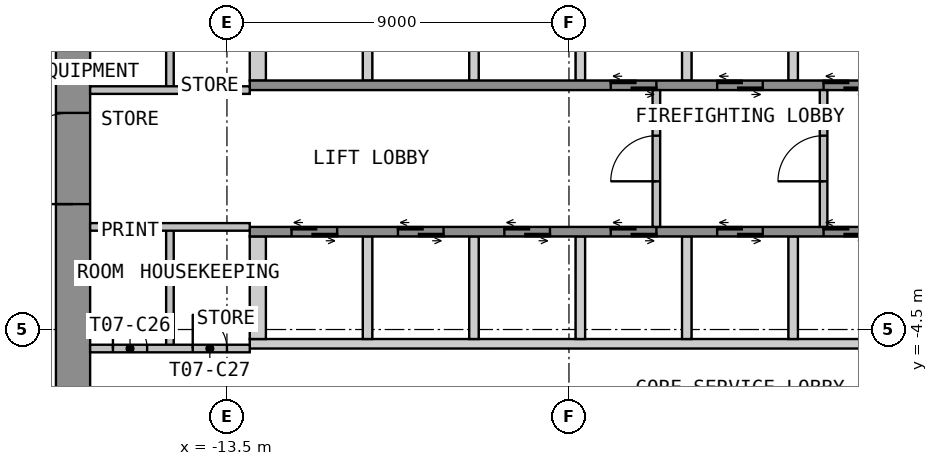
"""IFC4 building model, lengths in metres.
Left out: names, types, materials, properties, quantities, classifications, styles, units other than length and angle.
Written with IfcOpenShell. Run it as: python <this file> out.ifc"""

import sys

from ifc_helpers import new_model, si_unit, direction, frame, frame_2d, origin, place, context, subcontext, project, spatial, polyline, rectangle, outline, extrude, element, fill, save


model = new_model("IFC4")
c1 = context("Model", 3, precision=1e-05, world=origin(), true_north=direction((0.0, 1.0)))
c2 = subcontext(c1, "Body", "Model", "MODEL_VIEW")
j1 = project(units=[si_unit("LENGTHUNIT", "METRE"), si_unit("PLANEANGLEUNIT", "RADIAN")], contexts=[c1])
p1 = place(None, origin())
s1 = spatial("IfcSite", under=j1, at=p1, CompositionType="ELEMENT")
p2 = place(p1, origin())
s2 = spatial("IfcBuilding", under=s1, at=p2, CompositionType="ELEMENT")
p3 = place(p2, frame((0.0, 0.0, 104.7)))
s3 = spatial("IfcBuildingStorey", under=s2, at=p3, CompositionType="ELEMENT", Elevation=104.7)
p4 = place(p3, frame((-17.55, -12.6, 0.0), z_axis=(0.0, 0.0, 1.0), x_axis=(0.0, 1.0, 0.0)))
e1 = element("IfcWall", 1, at=p4, inside=s3, PredefinedType="SHEAR", context=c2, shape_type="SweptSolid", body=[
    extrude(rectangle(XDim=25.2, YDim=0.9, at=frame_2d((12.6, 0.0))), origin(), (0.0, 0.0, 1.0), 3.525),
])
p5 = place(p4, frame((11.4, 0.0, 0.0)))
e2 = element("IfcOpeningElement", 2, at=p5, cuts=e1, PredefinedType="OPENING", context=c2, shape_type="SweptSolid", body=[
    extrude(rectangle(XDim=2.4, YDim=2.1, at=frame_2d((1.2, 1.05))), frame((0.0, 0.46, 0.0), z_axis=(0.0, -1.0, 0.0), x_axis=(1.0, 0.0, 0.0)), (0.0, 0.0, 1.0), 0.92),
])
p6 = place(p3, origin())
e3 = element("IfcWall", 3, at=p6, inside=s3, PredefinedType="SHEAR", context=c2, shape_type="SweptSolid", body=[
    extrude(outline(polyline([(-12.9, 2.05), (-12.475, 2.05), (-12.475, 4.75), (-12.9, 4.75), (-12.9, 2.05)])), origin(), (0.0, 0.0, 1.0), 3.525),
])
p7 = place(p3, origin())
e4 = element("IfcWall", 4, at=p7, inside=s3, PredefinedType="SHEAR", context=c2, shape_type="SweptSolid", body=[
    extrude(outline(polyline([(-9.925, 2.05), (-9.675, 2.05), (-9.675, 4.75), (-9.925, 4.75), (-9.925, 2.05)])), origin(), (0.0, 0.0, 1.0), 3.525),
])
p8 = place(p3, origin())
e5 = element("IfcWall", 5, at=p8, inside=s3, PredefinedType="SHEAR", context=c2, shape_type="SweptSolid", body=[
    extrude(outline(polyline([(-7.125, 2.05), (-6.875, 2.05), (-6.875, 4.75), (-7.125, 4.75), (-7.125, 2.05)])), origin(), (0.0, 0.0, 1.0), 3.525),
])
p9 = place(p3, origin())
e6 = element("IfcWall", 6, at=p9, inside=s3, PredefinedType="SHEAR", context=c2, shape_type="SweptSolid", body=[
    extrude(outline(polyline([(-4.325, 2.05), (-4.075, 2.05), (-4.075, 4.75), (-4.325, 4.75), (-4.325, 2.05)])), origin(), (0.0, 0.0, 1.0), 3.525),
])
p10 = place(p3, origin())
e7 = element("IfcWall", 7, at=p10, inside=s3, PredefinedType="SHEAR", context=c2, shape_type="SweptSolid", body=[
    extrude(outline(polyline([(-1.525, 2.05), (-1.275, 2.05), (-1.275, 4.75), (-1.525, 4.75), (-1.525, 2.05)])), origin(), (0.0, 0.0, 1.0), 3.525),
])
p11 = place(p3, origin())
e8 = element("IfcWall", 8, at=p11, inside=s3, PredefinedType="SHEAR", context=c2, shape_type="SweptSolid", body=[
    extrude(outline(polyline([(1.275, 2.05), (1.525, 2.05), (1.525, 4.75), (1.275, 4.75), (1.275, 2.05)])), origin(), (0.0, 0.0, 1.0), 3.525),
])
p12 = place(p3, frame((-12.9, 1.925, 0.0), z_axis=(0.0, 0.0, 1.0), x_axis=(1.0, 0.0, 0.0)))
e9 = element("IfcWall", 9, at=p12, inside=s3, PredefinedType="SHEAR", context=c2, shape_type="SweptSolid", body=[
    extrude(rectangle(XDim=25.8, YDim=0.25, at=frame_2d((12.9, 0.0))), origin(), (0.0, 0.0, 1.0), 3.525),
])
p13 = place(p12, frame((9.5, 0.0, 0.0)))
e10 = element("IfcOpeningElement", 10, at=p13, cuts=e9, PredefinedType="OPENING", context=c2, shape_type="SweptSolid", body=[
    extrude(rectangle(XDim=1.2, YDim=2.1, at=frame_2d((0.6, 1.05))), frame((0.0, 0.135, 0.0), z_axis=(0.0, -1.0, 0.0), x_axis=(1.0, 0.0, 0.0)), (0.0, 0.0, 1.0), 0.27),
])
p14 = place(p12, frame((12.3, 0.0, 0.0)))
e11 = element("IfcOpeningElement", 11, at=p14, cuts=e9, PredefinedType="OPENING", context=c2, shape_type="SweptSolid", body=[
    extrude(rectangle(XDim=1.2, YDim=2.1, at=frame_2d((0.6, 1.05))), frame((0.0, 0.135, 0.0), z_axis=(0.0, -1.0, 0.0), x_axis=(1.0, 0.0, 0.0)), (0.0, 0.0, 1.0), 0.27),
])
p15 = place(p12, frame((15.1, 0.0, 0.0)))
e12 = element("IfcOpeningElement", 12, at=p15, cuts=e9, PredefinedType="OPENING", context=c2, shape_type="SweptSolid", body=[
    extrude(rectangle(XDim=1.2, YDim=2.1, at=frame_2d((0.6, 1.05))), frame((0.0, 0.135, 0.0), z_axis=(0.0, -1.0, 0.0), x_axis=(1.0, 0.0, 0.0)), (0.0, 0.0, 1.0), 0.27),
])
p16 = place(p12, frame((17.9, 0.0, 0.0)))
e13 = element("IfcOpeningElement", 13, at=p16, cuts=e9, PredefinedType="OPENING", context=c2, shape_type="SweptSolid", body=[
    extrude(rectangle(XDim=1.2, YDim=2.1, at=frame_2d((0.6, 1.05))), frame((0.0, 0.135, 0.0), z_axis=(0.0, -1.0, 0.0), x_axis=(1.0, 0.0, 0.0)), (0.0, 0.0, 1.0), 0.27),
])
p17 = place(p12, frame((20.7, 0.0, 0.0)))
e14 = element("IfcOpeningElement", 14, at=p17, cuts=e9, PredefinedType="OPENING", context=c2, shape_type="SweptSolid", body=[
    extrude(rectangle(XDim=1.2, YDim=2.1, at=frame_2d((0.6, 1.05))), frame((0.0, 0.135, 0.0), z_axis=(0.0, -1.0, 0.0), x_axis=(1.0, 0.0, 0.0)), (0.0, 0.0, 1.0), 0.27),
])
p18 = place(p12, frame((23.5, 0.0, 0.0)))
e15 = element("IfcOpeningElement", 15, at=p18, cuts=e9, PredefinedType="OPENING", context=c2, shape_type="SweptSolid", body=[
    extrude(rectangle(XDim=1.2, YDim=2.1, at=frame_2d((0.6, 1.05))), frame((0.0, 0.135, 0.0), z_axis=(0.0, -1.0, 0.0), x_axis=(1.0, 0.0, 0.0)), (0.0, 0.0, 1.0), 0.27),
])
p19 = place(p3, origin())
e16 = element("IfcWall", 16, at=p19, inside=s3, PredefinedType="SHEAR", context=c2, shape_type="SweptSolid", body=[
    extrude(outline(polyline([(-12.9, -5.0), (12.9, -5.0), (12.9, -4.75), (-12.9, -4.75), (-12.9, -5.0)])), origin(), (0.0, 0.0, 1.0), 3.525),
])
p20 = place(p3, origin())
e17 = element("IfcWall", 17, at=p20, inside=s3, PredefinedType="SHEAR", context=c2, shape_type="SweptSolid", body=[
    extrude(outline(polyline([(-12.9, -4.75), (-12.475, -4.75), (-12.475, -2.05), (-12.9, -2.05), (-12.9, -4.75)])), origin(), (0.0, 0.0, 1.0), 3.525),
])
p21 = place(p3, origin())
e18 = element("IfcWall", 18, at=p21, inside=s3, PredefinedType="SHEAR", context=c2, shape_type="SweptSolid", body=[
    extrude(outline(polyline([(-9.925, -4.75), (-9.675, -4.75), (-9.675, -2.05), (-9.925, -2.05), (-9.925, -4.75)])), origin(), (0.0, 0.0, 1.0), 3.525),
])
p22 = place(p3, origin())
e19 = element("IfcWall", 19, at=p22, inside=s3, PredefinedType="SHEAR", context=c2, shape_type="SweptSolid", body=[
    extrude(outline(polyline([(-7.125, -4.75), (-6.875, -4.75), (-6.875, -2.05), (-7.125, -2.05), (-7.125, -4.75)])), origin(), (0.0, 0.0, 1.0), 3.525),
])
p23 = place(p3, origin())
e20 = element("IfcWall", 20, at=p23, inside=s3, PredefinedType="SHEAR", context=c2, shape_type="SweptSolid", body=[
    extrude(outline(polyline([(-4.325, -4.75), (-4.075, -4.75), (-4.075, -2.05), (-4.325, -2.05), (-4.325, -4.75)])), origin(), (0.0, 0.0, 1.0), 3.525),
])
p24 = place(p3, origin())
e21 = element("IfcWall", 21, at=p24, inside=s3, PredefinedType="SHEAR", context=c2, shape_type="SweptSolid", body=[
    extrude(outline(polyline([(-1.525, -4.75), (-1.275, -4.75), (-1.275, -2.05), (-1.525, -2.05), (-1.525, -4.75)])), origin(), (0.0, 0.0, 1.0), 3.525),
])
p25 = place(p3, origin())
e22 = element("IfcWall", 22, at=p25, inside=s3, PredefinedType="SHEAR", context=c2, shape_type="SweptSolid", body=[
    extrude(outline(polyline([(1.275, -4.75), (1.525, -4.75), (1.525, -2.05), (1.275, -2.05), (1.275, -4.75)])), origin(), (0.0, 0.0, 1.0), 3.525),
])
p26 = place(p3, frame((-12.9, -1.925, 0.0), z_axis=(0.0, 0.0, 1.0), x_axis=(1.0, 0.0, 0.0)))
e23 = element("IfcWall", 23, at=p26, inside=s3, PredefinedType="SHEAR", context=c2, shape_type="SweptSolid", body=[
    extrude(rectangle(XDim=25.8, YDim=0.25, at=frame_2d((12.9, 0.0))), origin(), (0.0, 0.0, 1.0), 3.525),
])
p27 = place(p26, frame((1.1, 0.0, 0.0)))
e24 = element("IfcOpeningElement", 24, at=p27, cuts=e23, PredefinedType="OPENING", context=c2, shape_type="SweptSolid", body=[
    extrude(rectangle(XDim=1.2, YDim=2.1, at=frame_2d((0.6, 1.05))), frame((0.0, 0.135, 0.0), z_axis=(0.0, -1.0, 0.0), x_axis=(1.0, 0.0, 0.0)), (0.0, 0.0, 1.0), 0.27),
])
p28 = place(p26, frame((3.9, 0.0, 0.0)))
e25 = element("IfcOpeningElement", 25, at=p28, cuts=e23, PredefinedType="OPENING", context=c2, shape_type="SweptSolid", body=[
    extrude(rectangle(XDim=1.2, YDim=2.1, at=frame_2d((0.6, 1.05))), frame((0.0, 0.135, 0.0), z_axis=(0.0, -1.0, 0.0), x_axis=(1.0, 0.0, 0.0)), (0.0, 0.0, 1.0), 0.27),
])
p29 = place(p26, frame((6.7, 0.0, 0.0)))
e26 = element("IfcOpeningElement", 26, at=p29, cuts=e23, PredefinedType="OPENING", context=c2, shape_type="SweptSolid", body=[
    extrude(rectangle(XDim=1.2, YDim=2.1, at=frame_2d((0.6, 1.05))), frame((0.0, 0.135, 0.0), z_axis=(0.0, -1.0, 0.0), x_axis=(1.0, 0.0, 0.0)), (0.0, 0.0, 1.0), 0.27),
])
p30 = place(p26, frame((9.5, 0.0, 0.0)))
e27 = element("IfcOpeningElement", 27, at=p30, cuts=e23, PredefinedType="OPENING", context=c2, shape_type="SweptSolid", body=[
    extrude(rectangle(XDim=1.2, YDim=2.1, at=frame_2d((0.6, 1.05))), frame((0.0, 0.135, 0.0), z_axis=(0.0, -1.0, 0.0), x_axis=(1.0, 0.0, 0.0)), (0.0, 0.0, 1.0), 0.27),
])
p31 = place(p26, frame((12.3, 0.0, 0.0)))
e28 = element("IfcOpeningElement", 28, at=p31, cuts=e23, PredefinedType="OPENING", context=c2, shape_type="SweptSolid", body=[
    extrude(rectangle(XDim=1.2, YDim=2.1, at=frame_2d((0.6, 1.05))), frame((0.0, 0.135, 0.0), z_axis=(0.0, -1.0, 0.0), x_axis=(1.0, 0.0, 0.0)), (0.0, 0.0, 1.0), 0.27),
])
p32 = place(p26, frame((15.1, 0.0, 0.0)))
e29 = element("IfcOpeningElement", 29, at=p32, cuts=e23, PredefinedType="OPENING", context=c2, shape_type="SweptSolid", body=[
    extrude(rectangle(XDim=1.2, YDim=2.1, at=frame_2d((0.6, 1.05))), frame((0.0, 0.135, 0.0), z_axis=(0.0, -1.0, 0.0), x_axis=(1.0, 0.0, 0.0)), (0.0, 0.0, 1.0), 0.27),
])
p33 = place(p3, frame((-2.2, -1.8, 0.0), z_axis=(0.0, 0.0, 1.0), x_axis=(0.0, 1.0, 0.0)))
e30 = element("IfcWall", 30, at=p33, inside=s3, PredefinedType="PARTITIONING", context=c2, shape_type="SweptSolid", body=[
    extrude(rectangle(XDim=3.6, YDim=0.2, at=frame_2d((1.8, 0.0))), origin(), (0.0, 0.0, 1.0), 3.525),
])
p34 = place(p33, frame((1.2, 0.0, 0.0)))
e31 = element("IfcOpeningElement", 31, at=p34, cuts=e30, PredefinedType="OPENING", context=c2, shape_type="SweptSolid", body=[
    extrude(rectangle(XDim=1.2, YDim=2.1, at=frame_2d((0.6, 1.05))), frame((0.0, 0.11, 0.0), z_axis=(0.0, -1.0, 0.0), x_axis=(1.0, 0.0, 0.0)), (0.0, 0.0, 1.0), 0.22),
])
p35 = place(p3, frame((2.2, -1.8, 0.0), z_axis=(0.0, 0.0, 1.0), x_axis=(0.0, 1.0, 0.0)))
e32 = element("IfcWall", 32, at=p35, inside=s3, PredefinedType="PARTITIONING", context=c2, shape_type="SweptSolid", body=[
    extrude(rectangle(XDim=3.6, YDim=0.2, at=frame_2d((1.8, 0.0))), origin(), (0.0, 0.0, 1.0), 3.525),
])
p36 = place(p35, frame((1.2, 0.0, 0.0)))
e33 = element("IfcOpeningElement", 33, at=p36, cuts=e32, PredefinedType="OPENING", context=c2, shape_type="SweptSolid", body=[
    extrude(rectangle(XDim=1.2, YDim=2.1, at=frame_2d((0.6, 1.05))), frame((0.0, 0.11, 0.0), z_axis=(0.0, -1.0, 0.0), x_axis=(1.0, 0.0, 0.0)), (0.0, 0.0, 1.0), 0.22),
])
p37 = place(p3, frame((-15.0, 1.8, 0.0), z_axis=(0.0, 0.0, 1.0), x_axis=(0.0, 1.0, 0.0)))
e34 = element("IfcWall", 34, at=p37, inside=s3, PredefinedType="PARTITIONING", context=c2, shape_type="SweptSolid", body=[
    extrude(rectangle(XDim=3.2, YDim=0.2, at=frame_2d((1.6, 0.0))), origin(), (0.0, 0.0, 1.0), 3.525),
])
p38 = place(p3, frame((-17.1, 1.8, 0.0), z_axis=(0.0, 0.0, 1.0), x_axis=(1.0, 0.0, 0.0)))
e35 = element("IfcWall", 35, at=p38, inside=s3, PredefinedType="PARTITIONING", context=c2, shape_type="SweptSolid", body=[
    extrude(rectangle(XDim=4.2, YDim=0.2, at=frame_2d((2.1, 0.0))), origin(), (0.0, 0.0, 1.0), 3.525),
])
p39 = place(p3, frame((-15.0, -5.0, 0.0), z_axis=(0.0, 0.0, 1.0), x_axis=(0.0, 1.0, 0.0)))
e36 = element("IfcWall", 36, at=p39, inside=s3, PredefinedType="PARTITIONING", context=c2, shape_type="SweptSolid", body=[
    extrude(rectangle(XDim=3.2, YDim=0.2, at=frame_2d((1.6, 0.0))), origin(), (0.0, 0.0, 1.0), 3.525),
])
p40 = place(p3, frame((-17.1, -5.0, 0.0), z_axis=(0.0, 0.0, 1.0), x_axis=(1.0, 0.0, 0.0)))
e37 = element("IfcWall", 37, at=p40, inside=s3, PredefinedType="PARTITIONING", context=c2, shape_type="SweptSolid", body=[
    extrude(rectangle(XDim=4.2, YDim=0.2, at=frame_2d((2.1, 0.0))), origin(), (0.0, 0.0, 1.0), 3.525),
])
p41 = place(p40, frame((0.6, 0.0, 0.0)))
e38 = element("IfcOpeningElement", 38, at=p41, cuts=e37, PredefinedType="OPENING", context=c2, shape_type="SweptSolid", body=[
    extrude(rectangle(XDim=0.9, YDim=2.1, at=frame_2d((0.45, 1.05))), frame((0.0, 0.11, 0.0), z_axis=(0.0, -1.0, 0.0), x_axis=(1.0, 0.0, 0.0)), (0.0, 0.0, 1.0), 0.22),
])
p42 = place(p40, frame((2.7, 0.0, 0.0)))
e39 = element("IfcOpeningElement", 39, at=p42, cuts=e37, PredefinedType="OPENING", context=c2, shape_type="SweptSolid", body=[
    extrude(rectangle(XDim=0.9, YDim=2.1, at=frame_2d((0.45, 1.05))), frame((0.0, 0.11, 0.0), z_axis=(0.0, -1.0, 0.0), x_axis=(1.0, 0.0, 0.0)), (0.0, 0.0, 1.0), 0.22),
])
p43 = place(p3, frame((-17.1, -1.8, 0.0), z_axis=(0.0, 0.0, 1.0), x_axis=(1.0, 0.0, 0.0)))
e40 = element("IfcWall", 40, at=p43, inside=s3, PredefinedType="PARTITIONING", context=c2, shape_type="SweptSolid", body=[
    extrude(rectangle(XDim=4.2, YDim=0.2, at=frame_2d((2.1, 0.0))), origin(), (0.0, 0.0, 1.0), 3.525),
])
p44 = place(p5, origin())
e41 = element("IfcDoor", 41, at=p44, inside=s3, OperationType="DOUBLE_DOOR_DOUBLE_SWING", PredefinedType="DOOR", context=c2, shape_type="SweptSolid", body=[
    extrude(rectangle(XDim=2.4, YDim=2.1, at=frame_2d((1.2, 1.05))), frame((0.0, 0.025, 0.0), z_axis=(0.0, -1.0, 0.0), x_axis=(1.0, 0.0, 0.0)), (0.0, 0.0, 1.0), 0.05),
])
fill(e2, e41)
p45 = place(p13, origin())
e42 = element("IfcDoor", 42, at=p45, inside=s3, OperationType="DOUBLE_DOOR_SLIDING", PredefinedType="DOOR", context=c2, shape_type="SweptSolid", body=[
    extrude(rectangle(XDim=1.2, YDim=2.1, at=frame_2d((0.6, 1.05))), frame((0.0, 0.025, 0.0), z_axis=(0.0, -1.0, 0.0), x_axis=(1.0, 0.0, 0.0)), (0.0, 0.0, 1.0), 0.05),
])
fill(e10, e42)
p46 = place(p14, origin())
e43 = element("IfcDoor", 43, at=p46, inside=s3, OperationType="DOUBLE_DOOR_SLIDING", PredefinedType="DOOR", context=c2, shape_type="SweptSolid", body=[
    extrude(rectangle(XDim=1.2, YDim=2.1, at=frame_2d((0.6, 1.05))), frame((0.0, 0.025, 0.0), z_axis=(0.0, -1.0, 0.0), x_axis=(1.0, 0.0, 0.0)), (0.0, 0.0, 1.0), 0.05),
])
fill(e11, e43)
p47 = place(p15, origin())
e44 = element("IfcDoor", 44, at=p47, inside=s3, OperationType="DOUBLE_DOOR_SLIDING", PredefinedType="DOOR", context=c2, shape_type="SweptSolid", body=[
    extrude(rectangle(XDim=1.2, YDim=2.1, at=frame_2d((0.6, 1.05))), frame((0.0, 0.025, 0.0), z_axis=(0.0, -1.0, 0.0), x_axis=(1.0, 0.0, 0.0)), (0.0, 0.0, 1.0), 0.05),
])
fill(e12, e44)
p48 = place(p27, origin())
e45 = element("IfcDoor", 45, at=p48, inside=s3, OperationType="DOUBLE_DOOR_SLIDING", PredefinedType="DOOR", context=c2, shape_type="SweptSolid", body=[
    extrude(rectangle(XDim=1.2, YDim=2.1, at=frame_2d((0.6, 1.05))), frame((0.0, 0.025, 0.0), z_axis=(0.0, -1.0, 0.0), x_axis=(1.0, 0.0, 0.0)), (0.0, 0.0, 1.0), 0.05),
])
fill(e24, e45)
p49 = place(p28, origin())
e46 = element("IfcDoor", 46, at=p49, inside=s3, OperationType="DOUBLE_DOOR_SLIDING", PredefinedType="DOOR", context=c2, shape_type="SweptSolid", body=[
    extrude(rectangle(XDim=1.2, YDim=2.1, at=frame_2d((0.6, 1.05))), frame((0.0, 0.025, 0.0), z_axis=(0.0, -1.0, 0.0), x_axis=(1.0, 0.0, 0.0)), (0.0, 0.0, 1.0), 0.05),
])
fill(e25, e46)
p50 = place(p29, origin())
e47 = element("IfcDoor", 47, at=p50, inside=s3, OperationType="DOUBLE_DOOR_SLIDING", PredefinedType="DOOR", context=c2, shape_type="SweptSolid", body=[
    extrude(rectangle(XDim=1.2, YDim=2.1, at=frame_2d((0.6, 1.05))), frame((0.0, 0.025, 0.0), z_axis=(0.0, -1.0, 0.0), x_axis=(1.0, 0.0, 0.0)), (0.0, 0.0, 1.0), 0.05),
])
fill(e26, e47)
p51 = place(p30, origin())
e48 = element("IfcDoor", 48, at=p51, inside=s3, OperationType="DOUBLE_DOOR_SLIDING", PredefinedType="DOOR", context=c2, shape_type="SweptSolid", body=[
    extrude(rectangle(XDim=1.2, YDim=2.1, at=frame_2d((0.6, 1.05))), frame((0.0, 0.025, 0.0), z_axis=(0.0, -1.0, 0.0), x_axis=(1.0, 0.0, 0.0)), (0.0, 0.0, 1.0), 0.05),
])
fill(e27, e48)
p52 = place(p31, origin())
e49 = element("IfcDoor", 49, at=p52, inside=s3, OperationType="DOUBLE_DOOR_SLIDING", PredefinedType="DOOR", context=c2, shape_type="SweptSolid", body=[
    extrude(rectangle(XDim=1.2, YDim=2.1, at=frame_2d((0.6, 1.05))), frame((0.0, 0.025, 0.0), z_axis=(0.0, -1.0, 0.0), x_axis=(1.0, 0.0, 0.0)), (0.0, 0.0, 1.0), 0.05),
])
fill(e28, e49)
p53 = place(p32, origin())
e50 = element("IfcDoor", 50, at=p53, inside=s3, OperationType="DOUBLE_DOOR_SLIDING", PredefinedType="DOOR", context=c2, shape_type="SweptSolid", body=[
    extrude(rectangle(XDim=1.2, YDim=2.1, at=frame_2d((0.6, 1.05))), frame((0.0, 0.025, 0.0), z_axis=(0.0, -1.0, 0.0), x_axis=(1.0, 0.0, 0.0)), (0.0, 0.0, 1.0), 0.05),
])
fill(e29, e50)
p54 = place(p34, origin())
e51 = element("IfcDoor", 51, at=p54, inside=s3, OperationType="SINGLE_SWING_LEFT", PredefinedType="DOOR", context=c2, shape_type="SweptSolid", body=[
    extrude(rectangle(XDim=1.2, YDim=2.1, at=frame_2d((0.6, 1.05))), frame((0.0, 0.025, 0.0), z_axis=(0.0, -1.0, 0.0), x_axis=(1.0, 0.0, 0.0)), (0.0, 0.0, 1.0), 0.05),
])
fill(e31, e51)
p55 = place(p36, origin())
e52 = element("IfcDoor", 52, at=p55, inside=s3, OperationType="SINGLE_SWING_LEFT", PredefinedType="DOOR", context=c2, shape_type="SweptSolid", body=[
    extrude(rectangle(XDim=1.2, YDim=2.1, at=frame_2d((0.6, 1.05))), frame((0.0, 0.025, 0.0), z_axis=(0.0, -1.0, 0.0), x_axis=(1.0, 0.0, 0.0)), (0.0, 0.0, 1.0), 0.05),
])
fill(e33, e52)
p56 = place(p41, origin())
e53 = element("IfcDoor", 53, at=p56, inside=s3, OperationType="SINGLE_SWING_LEFT", PredefinedType="DOOR", context=c2, shape_type="SweptSolid", body=[
    extrude(rectangle(XDim=0.9, YDim=2.1, at=frame_2d((0.45, 1.05))), frame((0.0, 0.025, 0.0), z_axis=(0.0, -1.0, 0.0), x_axis=(1.0, 0.0, 0.0)), (0.0, 0.0, 1.0), 0.05),
])
fill(e38, e53)
p57 = place(p42, origin())
e54 = element("IfcDoor", 54, at=p57, inside=s3, OperationType="SINGLE_SWING_LEFT", PredefinedType="DOOR", context=c2, shape_type="SweptSolid", body=[
    extrude(rectangle(XDim=0.9, YDim=2.1, at=frame_2d((0.45, 1.05))), frame((0.0, 0.025, 0.0), z_axis=(0.0, -1.0, 0.0), x_axis=(1.0, 0.0, 0.0)), (0.0, 0.0, 1.0), 0.05),
])
fill(e39, e54)
save(model, sys.argv[1])
